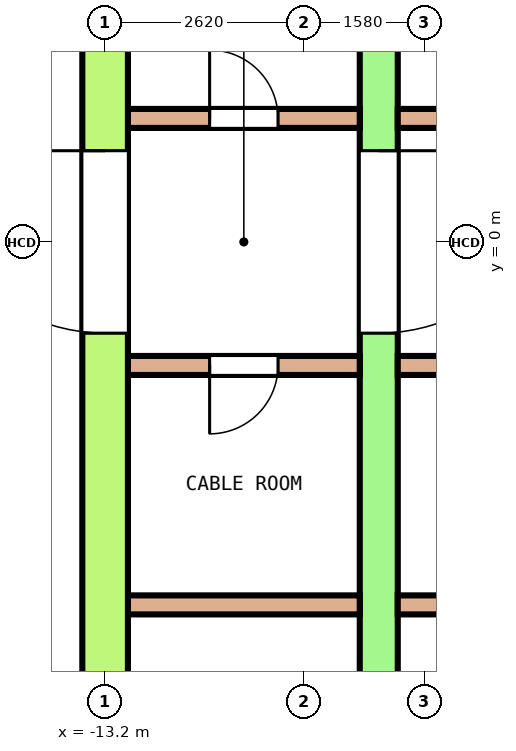
"""IFC4 building model, lengths in metres.
Left out: names, types, materials, properties, quantities, classifications, styles, units other than length and angle.
Written with IfcOpenShell. Run it as: python <this file> out.ifc"""

import sys

from ifc_helpers import new_model, si_unit, direction, frame, frame_2d, origin, place, context, subcontext, project, spatial, polyline, rectangle, outline, extrude, element, fill, save


model = new_model("IFC4")
c1 = context("Model", 3, precision=1e-05, world=origin(), true_north=direction((0.0, 1.0)))
c2 = subcontext(c1, "Body", "Model", "MODEL_VIEW")
j1 = project(units=[si_unit("LENGTHUNIT", "METRE"), si_unit("PLANEANGLEUNIT", "RADIAN")], contexts=[c1])
p1 = place(None, origin())
s1 = spatial("IfcSite", under=j1, at=p1, CompositionType="ELEMENT")
p2 = place(p1, origin())
s2 = spatial("IfcBuilding", under=s1, at=p2, CompositionType="ELEMENT")
p3 = place(p2, frame((0.0, 0.0, 237.4)))
s3 = spatial("IfcBuildingStorey", under=s2, at=p3, CompositionType="ELEMENT", Elevation=237.4)
p4 = place(p3, frame((-23.406, -2.26, 0.0), z_axis=(0.0, 0.0, 1.0), x_axis=(0.500001086243, -0.866024776641, 0.0)))
e1 = element("IfcWall", 1, at=p4, inside=s3, PredefinedType="SOLIDWALL", context=c2, shape_type="SweptSolid", body=[
    extrude(outline(polyline([(-0.027, -0.1), (1.002, -0.1), (2.031, -0.1), (3.059, -0.1), (4.088, -0.1), (5.117, -0.1), (6.146, -0.1), (7.175, -0.1), (8.203, -0.1), (9.232, -0.1), (10.261, -0.1), (11.29, -0.1), (12.318, -0.1), (13.347, -0.1), (14.376, -0.1), (15.405, -0.1), (16.433, -0.1), (17.462, -0.1), (18.491, -0.1), (19.52, -0.1), (19.466, 0.1), (18.443, 0.1), (17.42, 0.1), (16.396, 0.1), (15.373, 0.1), (14.35, 0.1), (13.327, 0.1), (12.304, 0.1), (11.281, 0.1), (10.258, 0.1), (9.235, 0.1), (8.212, 0.1), (7.188, 0.1), (6.166, 0.1), (5.142, 0.1), (4.119, 0.1), (3.096, 0.1), (2.073, 0.1), (1.05, 0.1), (0.027, 0.1), (-0.027, -0.1)])), origin(), (0.0, 0.0, 1.0), 3.7),
])
p5 = place(p4, frame((0.499, 0.0, 0.1)))
e2 = element("IfcOpeningElement", 2, at=p5, cuts=e1, PredefinedType="OPENING", context=c2, shape_type="SweptSolid", body=[
    extrude(rectangle(XDim=2.9, YDim=2.65, at=frame_2d((1.45, 1.325))), frame((0.0, 0.11, 0.0), z_axis=(0.0, -1.0, 0.0), x_axis=(1.0, 0.0, 0.0)), (0.0, 0.0, 1.0), 0.22),
])
p6 = place(p4, frame((4.398, 0.0, 0.1)))
e3 = element("IfcOpeningElement", 3, at=p6, cuts=e1, PredefinedType="OPENING", context=c2, shape_type="SweptSolid", body=[
    extrude(rectangle(XDim=2.9, YDim=2.65, at=frame_2d((1.45, 1.325))), frame((0.0, 0.11, 0.0), z_axis=(0.0, -1.0, 0.0), x_axis=(1.0, 0.0, 0.0)), (0.0, 0.0, 1.0), 0.22),
])
p7 = place(p4, frame((8.846, 0.0, 0.0)))
e4 = element("IfcOpeningElement", 4, at=p7, cuts=e1, PredefinedType="OPENING", context=c2, shape_type="SweptSolid", body=[
    extrude(rectangle(XDim=1.8, YDim=2.4, at=frame_2d((0.9, 1.2))), frame((0.0, 0.11, 0.0), z_axis=(0.0, -1.0, 0.0), x_axis=(1.0, 0.0, 0.0)), (0.0, 0.0, 1.0), 0.22),
])
p8 = place(p4, frame((8.846, 0.0, 2.55)))
e5 = element("IfcOpeningElement", 5, at=p8, cuts=e1, PredefinedType="OPENING", context=c2, shape_type="SweptSolid", body=[
    extrude(rectangle(XDim=1.8, YDim=0.2, at=frame_2d((0.9, 0.1))), frame((0.0, 0.11, 0.0), z_axis=(0.0, -1.0, 0.0), x_axis=(1.0, 0.0, 0.0)), (0.0, 0.0, 1.0), 0.22),
])
p9 = place(p4, frame((12.195, 0.0, 0.1)))
e6 = element("IfcOpeningElement", 6, at=p9, cuts=e1, PredefinedType="OPENING", context=c2, shape_type="SweptSolid", body=[
    extrude(rectangle(XDim=2.9, YDim=2.65, at=frame_2d((1.45, 1.325))), frame((0.0, 0.11, 0.0), z_axis=(0.0, -1.0, 0.0), x_axis=(1.0, 0.0, 0.0)), (0.0, 0.0, 1.0), 0.22),
])
p10 = place(p4, frame((16.094, 0.0, 0.1)))
e7 = element("IfcOpeningElement", 7, at=p10, cuts=e1, PredefinedType="OPENING", context=c2, shape_type="SweptSolid", body=[
    extrude(rectangle(XDim=2.9, YDim=2.65, at=frame_2d((1.45, 1.325))), frame((0.0, 0.11, 0.0), z_axis=(0.0, -1.0, 0.0), x_axis=(1.0, 0.0, 0.0)), (0.0, 0.0, 1.0), 0.22),
])
p11 = place(p3, frame((-13.2, -7.8, 0.0), z_axis=(0.0, 0.0, 1.0), x_axis=(0.0, 1.0, 0.0)))
e8 = element("IfcWall", 8, at=p11, inside=s3, PredefinedType="SHEAR", context=c2, shape_type="SweptSolid", body=[
    extrude(rectangle(XDim=15.6, YDim=0.6, at=frame_2d((7.8, 0.0))), origin(), (0.0, 0.0, 1.0), 3.7),
])
p12 = place(p11, frame((6.6, 0.0, 0.0)))
e9 = element("IfcOpeningElement", 9, at=p12, cuts=e8, PredefinedType="OPENING", context=c2, shape_type="SweptSolid", body=[
    extrude(rectangle(XDim=2.4, YDim=2.1, at=frame_2d((1.2, 1.05))), frame((0.0, 0.31, 0.0), z_axis=(0.0, -1.0, 0.0), x_axis=(1.0, 0.0, 0.0)), (0.0, 0.0, 1.0), 0.62),
])
p13 = place(p11, frame((13.5, 0.0, 0.0)))
e10 = element("IfcOpeningElement", 10, at=p13, cuts=e8, PredefinedType="OPENING", context=c2, shape_type="SweptSolid", body=[
    extrude(rectangle(XDim=1.2, YDim=2.1, at=frame_2d((0.6, 1.05))), frame((0.0, 0.31, 0.0), z_axis=(0.0, -1.0, 0.0), x_axis=(1.0, 0.0, 0.0)), (0.0, 0.0, 1.0), 0.62),
])
p14 = place(p11, frame((0.9, 0.0, 0.0)))
e11 = element("IfcOpeningElement", 11, at=p14, cuts=e8, PredefinedType="OPENING", context=c2, shape_type="SweptSolid", body=[
    extrude(rectangle(XDim=1.2, YDim=2.1, at=frame_2d((0.6, 1.05))), frame((0.0, 0.31, 0.0), z_axis=(0.0, -1.0, 0.0), x_axis=(1.0, 0.0, 0.0)), (0.0, 0.0, 1.0), 0.62),
])
p15 = place(p3, frame((-9.6, -7.8, 0.0), z_axis=(0.0, 0.0, 1.0), x_axis=(0.0, 1.0, 0.0)))
e12 = element("IfcWall", 12, at=p15, inside=s3, PredefinedType="SHEAR", context=c2, shape_type="SweptSolid", body=[
    extrude(rectangle(XDim=15.6, YDim=0.5, at=frame_2d((7.8, 0.0))), origin(), (0.0, 0.0, 1.0), 3.7),
])
p16 = place(p15, frame((6.6, 0.0, 0.0)))
e13 = element("IfcOpeningElement", 13, at=p16, cuts=e12, PredefinedType="OPENING", context=c2, shape_type="SweptSolid", body=[
    extrude(rectangle(XDim=2.4, YDim=2.1, at=frame_2d((1.2, 1.05))), frame((0.0, 0.26, 0.0), z_axis=(0.0, -1.0, 0.0), x_axis=(1.0, 0.0, 0.0)), (0.0, 0.0, 1.0), 0.52),
])
p17 = place(p15, frame((13.5, 0.0, 0.0)))
e14 = element("IfcOpeningElement", 14, at=p17, cuts=e12, PredefinedType="OPENING", context=c2, shape_type="SweptSolid", body=[
    extrude(rectangle(XDim=1.2, YDim=2.1, at=frame_2d((0.6, 1.05))), frame((0.0, 0.26, 0.0), z_axis=(0.0, -1.0, 0.0), x_axis=(1.0, 0.0, 0.0)), (0.0, 0.0, 1.0), 0.52),
])
p18 = place(p15, frame((0.9, 0.0, 0.0)))
e15 = element("IfcOpeningElement", 15, at=p18, cuts=e12, PredefinedType="OPENING", context=c2, shape_type="SweptSolid", body=[
    extrude(rectangle(XDim=1.2, YDim=2.1, at=frame_2d((0.6, 1.05))), frame((0.0, 0.26, 0.0), z_axis=(0.0, -1.0, 0.0), x_axis=(1.0, 0.0, 0.0)), (0.0, 0.0, 1.0), 0.52),
])
p19 = place(p3, frame((-12.9, 1.625, 0.0), z_axis=(0.0, 0.0, 1.0), x_axis=(1.0, 0.0, 0.0)))
e16 = element("IfcWall", 16, at=p19, inside=s3, PredefinedType="SOLIDWALL", context=c2, shape_type="SweptSolid", body=[
    extrude(rectangle(XDim=3.05, YDim=0.25, at=frame_2d((1.525, 0.0))), origin(), (0.0, 0.0, 1.0), 3.7),
])
p20 = place(p19, frame((1.075, 0.0, 0.0)))
e17 = element("IfcOpeningElement", 17, at=p20, cuts=e16, PredefinedType="OPENING", context=c2, shape_type="SweptSolid", body=[
    extrude(rectangle(XDim=0.9, YDim=2.1, at=frame_2d((0.45, 1.05))), frame((0.0, 0.135, 0.0), z_axis=(0.0, -1.0, 0.0), x_axis=(1.0, 0.0, 0.0)), (0.0, 0.0, 1.0), 0.27),
])
p21 = place(p3, frame((-9.35, 1.625, 0.0), z_axis=(0.0, 0.0, 1.0), x_axis=(1.0, 0.0, 0.0)))
e18 = element("IfcWall", 18, at=p21, inside=s3, PredefinedType="SOLIDWALL", context=c2, shape_type="SweptSolid", body=[
    extrude(rectangle(XDim=18.7, YDim=0.25, at=frame_2d((9.35, 0.0))), origin(), (0.0, 0.0, 1.0), 3.7),
])
p22 = place(p21, frame((7.65, 0.0, 0.0)))
e19 = element("IfcOpeningElement", 19, at=p22, cuts=e18, PredefinedType="OPENING", context=c2, shape_type="SweptSolid", body=[
    extrude(rectangle(XDim=1.1, YDim=2.1, at=frame_2d((0.55, 1.05))), frame((0.0, 0.135, 0.0), z_axis=(0.0, -1.0, 0.0), x_axis=(1.0, 0.0, 0.0)), (0.0, 0.0, 1.0), 0.27),
])
p23 = place(p21, frame((9.95, 0.0, 0.0)))
e20 = element("IfcOpeningElement", 20, at=p23, cuts=e18, PredefinedType="OPENING", context=c2, shape_type="SweptSolid", body=[
    extrude(rectangle(XDim=1.1, YDim=2.1, at=frame_2d((0.55, 1.05))), frame((0.0, 0.135, 0.0), z_axis=(0.0, -1.0, 0.0), x_axis=(1.0, 0.0, 0.0)), (0.0, 0.0, 1.0), 0.27),
])
p24 = place(p21, frame((12.4, 0.0, 0.0)))
e21 = element("IfcOpeningElement", 21, at=p24, cuts=e18, PredefinedType="OPENING", context=c2, shape_type="SweptSolid", body=[
    extrude(rectangle(XDim=1.1, YDim=2.1, at=frame_2d((0.55, 1.05))), frame((0.0, 0.135, 0.0), z_axis=(0.0, -1.0, 0.0), x_axis=(1.0, 0.0, 0.0)), (0.0, 0.0, 1.0), 0.27),
])
p25 = place(p21, frame((0.575, 0.0, 0.0)))
e22 = element("IfcOpeningElement", 22, at=p25, cuts=e18, PredefinedType="OPENING", context=c2, shape_type="SweptSolid", body=[
    extrude(rectangle(XDim=0.9, YDim=2.1, at=frame_2d((0.45, 1.05))), frame((0.0, 0.135, 0.0), z_axis=(0.0, -1.0, 0.0), x_axis=(1.0, 0.0, 0.0)), (0.0, 0.0, 1.0), 0.27),
])
p26 = place(p21, frame((2.919, 0.0, 0.0)))
e23 = element("IfcOpeningElement", 23, at=p26, cuts=e18, PredefinedType="OPENING", context=c2, shape_type="SweptSolid", body=[
    extrude(rectangle(XDim=0.9, YDim=2.1, at=frame_2d((0.45, 1.05))), frame((0.0, 0.135, 0.0), z_axis=(0.0, -1.0, 0.0), x_axis=(1.0, 0.0, 0.0)), (0.0, 0.0, 1.0), 0.27),
])
p27 = place(p21, frame((5.281, 0.0, 0.0)))
e24 = element("IfcOpeningElement", 24, at=p27, cuts=e18, PredefinedType="OPENING", context=c2, shape_type="SweptSolid", body=[
    extrude(rectangle(XDim=0.9, YDim=2.1, at=frame_2d((0.45, 1.05))), frame((0.0, 0.135, 0.0), z_axis=(0.0, -1.0, 0.0), x_axis=(1.0, 0.0, 0.0)), (0.0, 0.0, 1.0), 0.27),
])
p28 = place(p21, frame((14.9, 0.0, 0.0)))
e25 = element("IfcOpeningElement", 25, at=p28, cuts=e18, PredefinedType="OPENING", context=c2, shape_type="SweptSolid", body=[
    extrude(rectangle(XDim=0.9, YDim=2.1, at=frame_2d((0.45, 1.05))), frame((0.0, 0.135, 0.0), z_axis=(0.0, -1.0, 0.0), x_axis=(1.0, 0.0, 0.0)), (0.0, 0.0, 1.0), 0.27),
])
p29 = place(p21, frame((17.225, 0.0, 0.0)))
e26 = element("IfcOpeningElement", 26, at=p29, cuts=e18, PredefinedType="OPENING", context=c2, shape_type="SweptSolid", body=[
    extrude(rectangle(XDim=0.9, YDim=2.1, at=frame_2d((0.45, 1.05))), frame((0.0, 0.135, 0.0), z_axis=(0.0, -1.0, 0.0), x_axis=(1.0, 0.0, 0.0)), (0.0, 0.0, 1.0), 0.27),
])
p30 = place(p3, frame((-12.9, -1.625, 0.0), z_axis=(0.0, 0.0, 1.0), x_axis=(1.0, 0.0, 0.0)))
e27 = element("IfcWall", 27, at=p30, inside=s3, PredefinedType="SOLIDWALL", context=c2, shape_type="SweptSolid", body=[
    extrude(rectangle(XDim=3.05, YDim=0.25, at=frame_2d((1.525, 0.0))), origin(), (0.0, 0.0, 1.0), 3.7),
])
p31 = place(p30, frame((1.075, 0.0, 0.0)))
e28 = element("IfcOpeningElement", 28, at=p31, cuts=e27, PredefinedType="OPENING", context=c2, shape_type="SweptSolid", body=[
    extrude(rectangle(XDim=0.9, YDim=2.1, at=frame_2d((0.45, 1.05))), frame((0.0, 0.135, 0.0), z_axis=(0.0, -1.0, 0.0), x_axis=(1.0, 0.0, 0.0)), (0.0, 0.0, 1.0), 0.27),
])
p32 = place(p3, frame((-9.35, -1.625, 0.0), z_axis=(0.0, 0.0, 1.0), x_axis=(1.0, 0.0, 0.0)))
e29 = element("IfcWall", 29, at=p32, inside=s3, PredefinedType="SOLIDWALL", context=c2, shape_type="SweptSolid", body=[
    extrude(rectangle(XDim=18.7, YDim=0.25, at=frame_2d((9.35, 0.0))), origin(), (0.0, 0.0, 1.0), 3.7),
])
p33 = place(p32, frame((7.65, 0.0, 0.0)))
e30 = element("IfcOpeningElement", 30, at=p33, cuts=e29, PredefinedType="OPENING", context=c2, shape_type="SweptSolid", body=[
    extrude(rectangle(XDim=1.1, YDim=2.1, at=frame_2d((0.55, 1.05))), frame((0.0, 0.135, 0.0), z_axis=(0.0, -1.0, 0.0), x_axis=(1.0, 0.0, 0.0)), (0.0, 0.0, 1.0), 0.27),
])
p34 = place(p32, frame((9.95, 0.0, 0.0)))
e31 = element("IfcOpeningElement", 31, at=p34, cuts=e29, PredefinedType="OPENING", context=c2, shape_type="SweptSolid", body=[
    extrude(rectangle(XDim=1.1, YDim=2.1, at=frame_2d((0.55, 1.05))), frame((0.0, 0.135, 0.0), z_axis=(0.0, -1.0, 0.0), x_axis=(1.0, 0.0, 0.0)), (0.0, 0.0, 1.0), 0.27),
])
p35 = place(p32, frame((12.4, 0.0, 0.0)))
e32 = element("IfcOpeningElement", 32, at=p35, cuts=e29, PredefinedType="OPENING", context=c2, shape_type="SweptSolid", body=[
    extrude(rectangle(XDim=1.1, YDim=2.1, at=frame_2d((0.55, 1.05))), frame((0.0, 0.135, 0.0), z_axis=(0.0, -1.0, 0.0), x_axis=(1.0, 0.0, 0.0)), (0.0, 0.0, 1.0), 0.27),
])
p36 = place(p32, frame((0.575, 0.0, 0.0)))
e33 = element("IfcOpeningElement", 33, at=p36, cuts=e29, PredefinedType="OPENING", context=c2, shape_type="SweptSolid", body=[
    extrude(rectangle(XDim=0.9, YDim=2.1, at=frame_2d((0.45, 1.05))), frame((0.0, 0.135, 0.0), z_axis=(0.0, -1.0, 0.0), x_axis=(1.0, 0.0, 0.0)), (0.0, 0.0, 1.0), 0.27),
])
p37 = place(p32, frame((2.519, 0.0, 0.0)))
e34 = element("IfcOpeningElement", 34, at=p37, cuts=e29, PredefinedType="OPENING", context=c2, shape_type="SweptSolid", body=[
    extrude(rectangle(XDim=0.9, YDim=2.1, at=frame_2d((0.45, 1.05))), frame((0.0, 0.135, 0.0), z_axis=(0.0, -1.0, 0.0), x_axis=(1.0, 0.0, 0.0)), (0.0, 0.0, 1.0), 0.27),
])
p38 = place(p32, frame((4.881, 0.0, 0.0)))
e35 = element("IfcOpeningElement", 35, at=p38, cuts=e29, PredefinedType="OPENING", context=c2, shape_type="SweptSolid", body=[
    extrude(rectangle(XDim=0.9, YDim=2.1, at=frame_2d((0.45, 1.05))), frame((0.0, 0.135, 0.0), z_axis=(0.0, -1.0, 0.0), x_axis=(1.0, 0.0, 0.0)), (0.0, 0.0, 1.0), 0.27),
])
p39 = place(p32, frame((14.9, 0.0, 0.0)))
e36 = element("IfcOpeningElement", 36, at=p39, cuts=e29, PredefinedType="OPENING", context=c2, shape_type="SweptSolid", body=[
    extrude(rectangle(XDim=0.9, YDim=2.1, at=frame_2d((0.45, 1.05))), frame((0.0, 0.135, 0.0), z_axis=(0.0, -1.0, 0.0), x_axis=(1.0, 0.0, 0.0)), (0.0, 0.0, 1.0), 0.27),
])
p40 = place(p32, frame((17.225, 0.0, 0.0)))
e37 = element("IfcOpeningElement", 37, at=p40, cuts=e29, PredefinedType="OPENING", context=c2, shape_type="SweptSolid", body=[
    extrude(rectangle(XDim=0.9, YDim=2.1, at=frame_2d((0.45, 1.05))), frame((0.0, 0.135, 0.0), z_axis=(0.0, -1.0, 0.0), x_axis=(1.0, 0.0, 0.0)), (0.0, 0.0, 1.0), 0.27),
])
p41 = place(p3, frame((-12.9, -4.775, 0.0), z_axis=(0.0, 0.0, 1.0), x_axis=(1.0, 0.0, 0.0)))
e38 = element("IfcWall", 38, at=p41, inside=s3, PredefinedType="SOLIDWALL", context=c2, shape_type="SweptSolid", body=[
    extrude(rectangle(XDim=3.05, YDim=0.25, at=frame_2d((1.525, 0.0))), origin(), (0.0, 0.0, 1.0), 3.7),
])
p42 = place(p3, frame((-9.35, -4.775, 0.0), z_axis=(0.0, 0.0, 1.0), x_axis=(1.0, 0.0, 0.0)))
e39 = element("IfcWall", 39, at=p42, inside=s3, PredefinedType="SOLIDWALL", context=c2, shape_type="SweptSolid", body=[
    extrude(rectangle(XDim=18.7, YDim=0.25, at=frame_2d((9.35, 0.0))), origin(), (0.0, 0.0, 1.0), 3.7),
])
p43 = place(p16, origin())
e40 = element("IfcDoor", 40, at=p43, inside=s3, OperationType="DOUBLE_DOOR_SINGLE_SWING", PredefinedType="DOOR", context=c2, shape_type="SweptSolid", body=[
    extrude(rectangle(XDim=2.4, YDim=2.1, at=frame_2d((1.2, 1.05))), frame((0.0, 0.2, 0.0), z_axis=(0.0, -1.0, 0.0), x_axis=(1.0, 0.0, 0.0)), (0.0, 0.0, 1.0), 0.4),
])
fill(e13, e40)
p44 = place(p12, origin())
e41 = element("IfcDoor", 41, at=p44, inside=s3, OperationType="DOUBLE_DOOR_SINGLE_SWING", PredefinedType="DOOR", context=c2, shape_type="SweptSolid", body=[
    extrude(rectangle(XDim=2.4, YDim=2.1, at=frame_2d((1.2, 1.05))), frame((0.0, 0.25, 0.0), z_axis=(0.0, -1.0, 0.0), x_axis=(1.0, 0.0, 0.0)), (0.0, 0.0, 1.0), 0.5),
])
fill(e9, e41)
p45 = place(p20, origin())
e42 = element("IfcDoor", 42, at=p45, inside=s3, OperationType="SINGLE_SWING_RIGHT", PredefinedType="DOOR", context=c2, shape_type="SweptSolid", body=[
    extrude(rectangle(XDim=0.9, YDim=2.1, at=frame_2d((0.45, 1.05))), frame((0.0, 0.075, 0.0), z_axis=(0.0, -1.0, 0.0), x_axis=(1.0, 0.0, 0.0)), (0.0, 0.0, 1.0), 0.15),
])
fill(e17, e42)
p46 = place(p31, origin())
e43 = element("IfcDoor", 43, at=p46, inside=s3, OperationType="SINGLE_SWING_LEFT", PredefinedType="DOOR", context=c2, shape_type="SweptSolid", body=[
    extrude(rectangle(XDim=0.9, YDim=2.1, at=frame_2d((0.45, 1.05))), frame((0.0, 0.075, 0.0), z_axis=(0.0, -1.0, 0.0), x_axis=(1.0, 0.0, 0.0)), (0.0, 0.0, 1.0), 0.15),
])
fill(e28, e43)
save(model, sys.argv[1])
